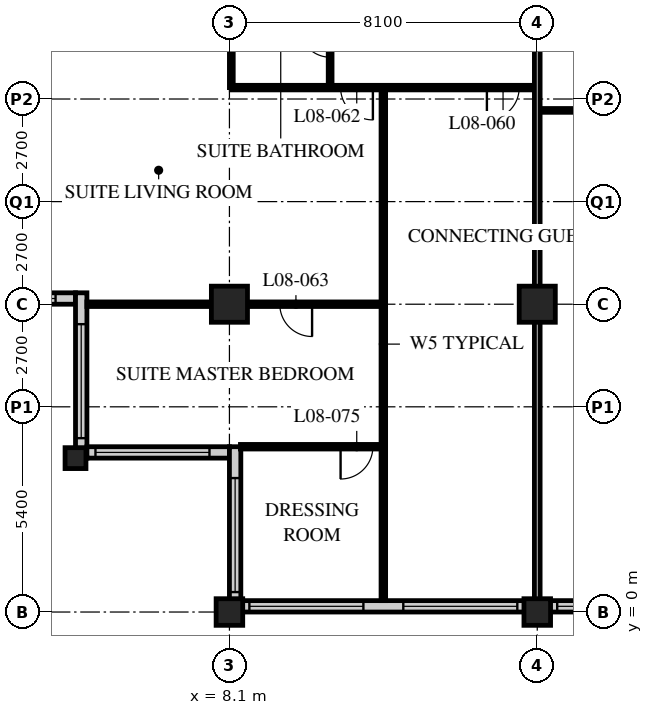
"""IFC4 building model, lengths in metres.
Left out: names, types, materials, properties, quantities, classifications, styles, units other than length and angle.
Written with IfcOpenShell. Run it as: python <this file> out.ifc"""

import sys

from ifc_helpers import new_model, si_unit, direction, frame, frame_2d, origin, origin_2d, place, context, subcontext, project, spatial, rectangle, hollow_rectangle, extrude, element, fill, save


model = new_model("IFC4")
c1 = context("Model", 3, precision=1e-05, world=origin(), true_north=direction((0.0, 1.0)))
c2 = subcontext(c1, "Body", "Model", "MODEL_VIEW")
j1 = project(units=[si_unit("LENGTHUNIT", "METRE"), si_unit("PLANEANGLEUNIT", "RADIAN")], contexts=[c1])
p1 = place(None, origin())
s1 = spatial("IfcSite", under=j1, at=p1, CompositionType="ELEMENT")
p2 = place(p1, origin())
s2 = spatial("IfcBuilding", under=s1, at=p2, CompositionType="ELEMENT")
p3 = place(p2, frame((0.0, 0.0, 39.8)))
s3 = spatial("IfcBuildingStorey", under=s2, at=p3, CompositionType="ELEMENT", Elevation=39.8)
p4 = place(p3, frame((4.05, 4.05, 0.0), z_axis=(0.0, 0.0, 1.0), x_axis=(1.0, 0.0, 0.0)))
e1 = element("IfcColumn", 1, at=p4, inside=s3, PredefinedType="COLUMN", context=c2, shape_type="SweptSolid", body=[
    extrude(hollow_rectangle(XDim=0.55, YDim=0.55, WallThickness=0.05, at=origin_2d()), origin(), (0.0, 0.0, 1.0), 3.4),
])
p5 = place(p3, frame((8.1, 0.0, 0.0), z_axis=(0.0, 0.0, 1.0), x_axis=(1.0, 0.0, 0.0)))
e2 = element("IfcColumn", 2, at=p5, inside=s3, PredefinedType="COLUMN", context=c2, shape_type="SweptSolid", body=[
    extrude(hollow_rectangle(XDim=0.7, YDim=0.7, WallThickness=0.06, at=origin_2d()), origin(), (0.0, 0.0, 1.0), 3.4),
])
p6 = place(p3, frame((8.1, 8.1, 0.0), z_axis=(0.0, 0.0, 1.0), x_axis=(1.0, 0.0, 0.0)))
e3 = element("IfcColumn", 3, at=p6, inside=s3, PredefinedType="COLUMN", context=c2, shape_type="SweptSolid", body=[
    extrude(hollow_rectangle(XDim=0.95, YDim=0.95, WallThickness=0.095, at=origin_2d()), origin(), (0.0, 0.0, 1.0), 3.4),
])
p7 = place(p3, frame((16.2, 0.0, 0.0), z_axis=(0.0, 0.0, 1.0), x_axis=(1.0, 0.0, 0.0)))
e4 = element("IfcColumn", 4, at=p7, inside=s3, PredefinedType="COLUMN", context=c2, shape_type="SweptSolid", body=[
    extrude(hollow_rectangle(XDim=0.7, YDim=0.7, WallThickness=0.06, at=origin_2d()), origin(), (0.0, 0.0, 1.0), 3.4),
])
p8 = place(p3, frame((16.2, 8.1, 0.0), z_axis=(0.0, 0.0, 1.0), x_axis=(1.0, 0.0, 0.0)))
e5 = element("IfcColumn", 5, at=p8, inside=s3, PredefinedType="COLUMN", context=c2, shape_type="SweptSolid", body=[
    extrude(hollow_rectangle(XDim=0.95, YDim=0.95, WallThickness=0.095, at=origin_2d()), origin(), (0.0, 0.0, 1.0), 3.4),
])
p9 = place(p3, frame((8.4, 0.15, 0.0), z_axis=(0.0, 0.0, 1.0), x_axis=(1.0, 0.0, 0.0)))
e6 = element("IfcWall", 6, at=p9, inside=s3, PredefinedType="SOLIDWALL", context=c2, shape_type="SweptSolid", body=[
    extrude(rectangle(XDim=40.2, YDim=0.3, at=frame_2d((20.1, 0.0))), origin(), (0.0, 0.0, 1.0), 3.19),
])
p10 = place(p9, frame((0.225, 0.0, 0.9)))
e7 = element("IfcOpeningElement", 7, at=p10, cuts=e6, PredefinedType="OPENING", context=c2, shape_type="SweptSolid", body=[
    extrude(rectangle(XDim=3.0, YDim=2.0, at=frame_2d((1.5, 1.0))), frame((0.0, 0.16, 0.0), z_axis=(0.0, -1.0, 0.0), x_axis=(1.0, 0.0, 0.0)), (0.0, 0.0, 1.0), 0.32),
])
p11 = place(p9, frame((4.275, 0.0, 0.9)))
e8 = element("IfcOpeningElement", 8, at=p11, cuts=e6, PredefinedType="OPENING", context=c2, shape_type="SweptSolid", body=[
    extrude(rectangle(XDim=3.0, YDim=2.0, at=frame_2d((1.5, 1.0))), frame((0.0, 0.16, 0.0), z_axis=(0.0, -1.0, 0.0), x_axis=(1.0, 0.0, 0.0)), (0.0, 0.0, 1.0), 0.32),
])
p12 = place(p9, frame((8.325, 0.0, 0.9)))
e9 = element("IfcOpeningElement", 9, at=p12, cuts=e6, PredefinedType="OPENING", context=c2, shape_type="SweptSolid", body=[
    extrude(rectangle(XDim=3.0, YDim=2.0, at=frame_2d((1.5, 1.0))), frame((0.0, 0.16, 0.0), z_axis=(0.0, -1.0, 0.0), x_axis=(1.0, 0.0, 0.0)), (0.0, 0.0, 1.0), 0.32),
])
p13 = place(p9, frame((12.375, 0.0, 0.9)))
e10 = element("IfcOpeningElement", 10, at=p13, cuts=e6, PredefinedType="OPENING", context=c2, shape_type="SweptSolid", body=[
    extrude(rectangle(XDim=3.0, YDim=2.0, at=frame_2d((1.5, 1.0))), frame((0.0, 0.16, 0.0), z_axis=(0.0, -1.0, 0.0), x_axis=(1.0, 0.0, 0.0)), (0.0, 0.0, 1.0), 0.32),
])
p14 = place(p9, frame((16.425, 0.0, 0.9)))
e11 = element("IfcOpeningElement", 11, at=p14, cuts=e6, PredefinedType="OPENING", context=c2, shape_type="SweptSolid", body=[
    extrude(rectangle(XDim=3.0, YDim=2.0, at=frame_2d((1.5, 1.0))), frame((0.0, 0.16, 0.0), z_axis=(0.0, -1.0, 0.0), x_axis=(1.0, 0.0, 0.0)), (0.0, 0.0, 1.0), 0.32),
])
p15 = place(p9, frame((20.475, 0.0, 0.9)))
e12 = element("IfcOpeningElement", 12, at=p15, cuts=e6, PredefinedType="OPENING", context=c2, shape_type="SweptSolid", body=[
    extrude(rectangle(XDim=3.0, YDim=2.0, at=frame_2d((1.5, 1.0))), frame((0.0, 0.16, 0.0), z_axis=(0.0, -1.0, 0.0), x_axis=(1.0, 0.0, 0.0)), (0.0, 0.0, 1.0), 0.32),
])
p16 = place(p9, frame((24.525, 0.0, 0.9)))
e13 = element("IfcOpeningElement", 13, at=p16, cuts=e6, PredefinedType="OPENING", context=c2, shape_type="SweptSolid", body=[
    extrude(rectangle(XDim=3.0, YDim=2.0, at=frame_2d((1.5, 1.0))), frame((0.0, 0.16, 0.0), z_axis=(0.0, -1.0, 0.0), x_axis=(1.0, 0.0, 0.0)), (0.0, 0.0, 1.0), 0.32),
])
p17 = place(p9, frame((28.575, 0.0, 0.9)))
e14 = element("IfcOpeningElement", 14, at=p17, cuts=e6, PredefinedType="OPENING", context=c2, shape_type="SweptSolid", body=[
    extrude(rectangle(XDim=3.0, YDim=2.0, at=frame_2d((1.5, 1.0))), frame((0.0, 0.16, 0.0), z_axis=(0.0, -1.0, 0.0), x_axis=(1.0, 0.0, 0.0)), (0.0, 0.0, 1.0), 0.32),
])
p18 = place(p9, frame((32.625, 0.0, 0.9)))
e15 = element("IfcOpeningElement", 15, at=p18, cuts=e6, PredefinedType="OPENING", context=c2, shape_type="SweptSolid", body=[
    extrude(rectangle(XDim=3.0, YDim=2.0, at=frame_2d((1.5, 1.0))), frame((0.0, 0.16, 0.0), z_axis=(0.0, -1.0, 0.0), x_axis=(1.0, 0.0, 0.0)), (0.0, 0.0, 1.0), 0.32),
])
p19 = place(p9, frame((36.675, 0.0, 0.9)))
e16 = element("IfcOpeningElement", 16, at=p19, cuts=e6, PredefinedType="OPENING", context=c2, shape_type="SweptSolid", body=[
    extrude(rectangle(XDim=3.0, YDim=2.0, at=frame_2d((1.5, 1.0))), frame((0.0, 0.16, 0.0), z_axis=(0.0, -1.0, 0.0), x_axis=(1.0, 0.0, 0.0)), (0.0, 0.0, 1.0), 0.32),
])
p20 = place(p3, frame((0.3, 8.25, 0.0), z_axis=(0.0, 0.0, 1.0), x_axis=(1.0, 0.0, 0.0)))
e17 = element("IfcWall", 17, at=p20, inside=s3, PredefinedType="SOLIDWALL", context=c2, shape_type="SweptSolid", body=[
    extrude(rectangle(XDim=3.75, YDim=0.3, at=frame_2d((1.875, 0.0))), origin(), (0.0, 0.0, 1.0), 3.19),
])
p21 = place(p20, frame((0.225, 0.0, 0.9)))
e18 = element("IfcOpeningElement", 18, at=p21, cuts=e17, PredefinedType="OPENING", context=c2, shape_type="SweptSolid", body=[
    extrude(rectangle(XDim=3.0, YDim=1.5, at=frame_2d((1.5, 0.75))), frame((0.0, 0.16, 0.0), z_axis=(0.0, -1.0, 0.0), x_axis=(1.0, 0.0, 0.0)), (0.0, 0.0, 1.0), 0.32),
])
p22 = place(p3, frame((4.2, 8.4, 0.0), z_axis=(0.0, 0.0, 1.0), x_axis=(0.0, -1.0, 0.0)))
e19 = element("IfcWall", 19, at=p22, inside=s3, PredefinedType="SOLIDWALL", context=c2, shape_type="SweptSolid", body=[
    extrude(rectangle(XDim=4.35, YDim=0.3, at=frame_2d((2.175, 0.0))), origin(), (0.0, 0.0, 1.0), 3.19),
])
p23 = place(p22, frame((0.825, 0.0, 0.9)))
e20 = element("IfcOpeningElement", 20, at=p23, cuts=e19, PredefinedType="OPENING", context=c2, shape_type="SweptSolid", body=[
    extrude(rectangle(XDim=3.0, YDim=1.5, at=frame_2d((1.5, 0.75))), frame((0.0, 0.16, 0.0), z_axis=(0.0, -1.0, 0.0), x_axis=(1.0, 0.0, 0.0)), (0.0, 0.0, 1.0), 0.32),
])
p24 = place(p3, frame((4.35, 4.2, 0.0), z_axis=(0.0, 0.0, 1.0), x_axis=(1.0, 0.0, 0.0)))
e21 = element("IfcWall", 21, at=p24, inside=s3, PredefinedType="SOLIDWALL", context=c2, shape_type="SweptSolid", body=[
    extrude(rectangle(XDim=3.75, YDim=0.3, at=frame_2d((1.875, 0.0))), origin(), (0.0, 0.0, 1.0), 3.19),
])
p25 = place(p24, frame((0.225, 0.0, 0.9)))
e22 = element("IfcOpeningElement", 22, at=p25, cuts=e21, PredefinedType="OPENING", context=c2, shape_type="SweptSolid", body=[
    extrude(rectangle(XDim=3.0, YDim=1.5, at=frame_2d((1.5, 0.75))), frame((0.0, 0.16, 0.0), z_axis=(0.0, -1.0, 0.0), x_axis=(1.0, 0.0, 0.0)), (0.0, 0.0, 1.0), 0.32),
])
p26 = place(p3, frame((8.25, 4.35, 0.0), z_axis=(0.0, 0.0, 1.0), x_axis=(0.0, -1.0, 0.0)))
e23 = element("IfcWall", 23, at=p26, inside=s3, PredefinedType="SOLIDWALL", context=c2, shape_type="SweptSolid", body=[
    extrude(rectangle(XDim=4.35, YDim=0.3, at=frame_2d((2.175, 0.0))), origin(), (0.0, 0.0, 1.0), 3.19),
])
p27 = place(p26, frame((0.825, 0.0, 0.9)))
e24 = element("IfcOpeningElement", 24, at=p27, cuts=e23, PredefinedType="OPENING", context=c2, shape_type="SweptSolid", body=[
    extrude(rectangle(XDim=3.0, YDim=1.5, at=frame_2d((1.5, 0.75))), frame((0.0, 0.16, 0.0), z_axis=(0.0, -1.0, 0.0), x_axis=(1.0, 0.0, 0.0)), (0.0, 0.0, 1.0), 0.32),
])
p28 = place(p3, frame((16.2, 13.2, 0.0), z_axis=(0.0, 0.0, 1.0), x_axis=(1.0, 0.0, 0.0)))
e25 = element("IfcWall", 25, at=p28, inside=s3, PredefinedType="PARTITIONING", context=c2, shape_type="SweptSolid", body=[
    extrude(rectangle(XDim=2.3, YDim=0.1, at=frame_2d((1.15, 0.0))), origin(), (0.0, 0.0, 1.0), 3.19),
])
p29 = place(p3, frame((10.75, 16.2, 0.0), z_axis=(0.0, 0.0, 1.0), x_axis=(0.0, -1.0, 0.0)))
e26 = element("IfcWall", 26, at=p29, inside=s3, PredefinedType="PARTITIONING", context=c2, shape_type="SweptSolid", body=[
    extrude(rectangle(XDim=2.4, YDim=0.1, at=frame_2d((1.2, 0.0))), origin(), (0.0, 0.0, 1.0), 3.19),
])
p30 = place(p29, frame((0.8, 0.0, 0.0)))
e27 = element("IfcOpeningElement", 27, at=p30, cuts=e26, PredefinedType="OPENING", context=c2, shape_type="SweptSolid", body=[
    extrude(rectangle(XDim=0.8, YDim=2.1, at=frame_2d((0.4, 1.05))), frame((0.0, 0.06, 0.0), z_axis=(0.0, -1.0, 0.0), x_axis=(1.0, 0.0, 0.0)), (0.0, 0.0, 1.0), 0.12),
])
p31 = place(p3, frame((8.15, 16.2, 0.0), z_axis=(0.0, 0.0, 1.0), x_axis=(0.0, -1.0, 0.0)))
e28 = element("IfcWall", 28, at=p31, inside=s3, PredefinedType="PARTITIONING", context=c2, shape_type="SweptSolid", body=[
    extrude(rectangle(XDim=2.4, YDim=0.1, at=frame_2d((1.2, 0.0))), origin(), (0.0, 0.0, 1.0), 2.578),
])
p32 = place(p3, frame((8.15, 13.8, 0.0), z_axis=(0.0, 0.0, 1.0), x_axis=(1.0, 0.0, 0.0)))
e29 = element("IfcWall", 29, at=p32, inside=s3, PredefinedType="PARTITIONING", context=c2, shape_type="SweptSolid", body=[
    extrude(rectangle(XDim=8.05, YDim=0.12, at=frame_2d((4.025, 0.0))), origin(), (0.0, 0.0, 1.0), 3.19),
])
p33 = place(p32, frame((6.725, 0.0, 0.0)))
e30 = element("IfcOpeningElement", 30, at=p33, cuts=e29, PredefinedType="OPENING", context=c2, shape_type="SweptSolid", body=[
    extrude(rectangle(XDim=0.85, YDim=2.1, at=frame_2d((0.425, 1.05))), frame((0.0, 0.07, 0.0), z_axis=(0.0, -1.0, 0.0), x_axis=(1.0, 0.0, 0.0)), (0.0, 0.0, 1.0), 0.14),
])
p34 = place(p32, frame((2.875, 0.0, 0.0)))
e31 = element("IfcOpeningElement", 31, at=p34, cuts=e29, PredefinedType="OPENING", context=c2, shape_type="SweptSolid", body=[
    extrude(rectangle(XDim=0.85, YDim=2.1, at=frame_2d((0.425, 1.05))), frame((0.0, 0.07, 0.0), z_axis=(0.0, -1.0, 0.0), x_axis=(1.0, 0.0, 0.0)), (0.0, 0.0, 1.0), 0.14),
])
p35 = place(p3, frame((12.15, 13.8, 0.0), z_axis=(0.0, 0.0, 1.0), x_axis=(0.0, -1.0, 0.0)))
e32 = element("IfcWall", 32, at=p35, inside=s3, PredefinedType="PARTITIONING", context=c2, shape_type="SweptSolid", body=[
    extrude(rectangle(XDim=13.5, YDim=0.12, at=frame_2d((6.75, 0.0))), origin(), (0.0, 0.0, 1.0), 3.19),
])
p36 = place(p3, frame((12.15, 8.1, 0.0), z_axis=(0.0, 0.0, 1.0), x_axis=(-1.0, 0.0, 0.0)))
e33 = element("IfcWall", 33, at=p36, inside=s3, PredefinedType="PARTITIONING", context=c2, shape_type="SweptSolid", body=[
    extrude(rectangle(XDim=7.8, YDim=0.12, at=frame_2d((3.9, 0.0))), origin(), (0.0, 0.0, 1.0), 2.578),
])
p37 = place(p36, frame((1.875, 0.0, 0.0)))
e34 = element("IfcOpeningElement", 34, at=p37, cuts=e33, PredefinedType="OPENING", context=c2, shape_type="SweptSolid", body=[
    extrude(rectangle(XDim=0.85, YDim=2.1, at=frame_2d((0.425, 1.05))), frame((0.0, 0.07, 0.0), z_axis=(0.0, -1.0, 0.0), x_axis=(1.0, 0.0, 0.0)), (0.0, 0.0, 1.0), 0.14),
])
p38 = place(p3, frame((16.2, 16.2, 0.0), z_axis=(0.0, 0.0, 1.0), x_axis=(0.0, -1.0, 0.0)))
e35 = element("IfcWall", 35, at=p38, inside=s3, PredefinedType="PARTITIONING", context=c2, shape_type="SweptSolid", body=[
    extrude(rectangle(XDim=15.9, YDim=0.15, at=frame_2d((7.95, 0.0))), origin(), (0.0, 0.0, 1.0), 2.578),
])
p39 = place(p3, frame((8.39, 4.35, 0.0), z_axis=(0.0, 0.0, 1.0), x_axis=(1.0, 0.0, 0.0)))
e36 = element("IfcWall", 36, at=p39, inside=s3, PredefinedType="PARTITIONING", context=c2, shape_type="SweptSolid", body=[
    extrude(rectangle(XDim=3.76, YDim=0.12, at=frame_2d((1.88, 0.0))), origin(), (0.0, 0.0, 1.0), 3.19),
])
p40 = place(p39, frame((2.635, 0.0, 0.0)))
e37 = element("IfcOpeningElement", 37, at=p40, cuts=e36, PredefinedType="OPENING", context=c2, shape_type="SweptSolid", body=[
    extrude(rectangle(XDim=0.85, YDim=2.1, at=frame_2d((0.425, 1.05))), frame((0.0, 0.07, 0.0), z_axis=(0.0, -1.0, 0.0), x_axis=(1.0, 0.0, 0.0)), (0.0, 0.0, 1.0), 0.14),
])
p41 = place(p10, origin())
e38 = element("IfcWindow", 38, at=p41, inside=s3, PartitioningType="SINGLE_PANEL", PredefinedType="WINDOW", context=c2, shape_type="SweptSolid", body=[
    extrude(rectangle(XDim=3.0, YDim=2.0, at=frame_2d((1.5, 1.0))), frame((0.0, 0.03, 0.0), z_axis=(0.0, -1.0, 0.0), x_axis=(1.0, 0.0, 0.0)), (0.0, 0.0, 1.0), 0.06),
])
fill(e7, e38)
p42 = place(p11, origin())
e39 = element("IfcWindow", 39, at=p42, inside=s3, PartitioningType="SINGLE_PANEL", PredefinedType="WINDOW", context=c2, shape_type="SweptSolid", body=[
    extrude(rectangle(XDim=3.0, YDim=2.0, at=frame_2d((1.5, 1.0))), frame((0.0, 0.03, 0.0), z_axis=(0.0, -1.0, 0.0), x_axis=(1.0, 0.0, 0.0)), (0.0, 0.0, 1.0), 0.06),
])
fill(e8, e39)
p43 = place(p12, origin())
e40 = element("IfcWindow", 40, at=p43, inside=s3, PartitioningType="SINGLE_PANEL", PredefinedType="WINDOW", context=c2, shape_type="SweptSolid", body=[
    extrude(rectangle(XDim=3.0, YDim=2.0, at=frame_2d((1.5, 1.0))), frame((0.0, 0.03, 0.0), z_axis=(0.0, -1.0, 0.0), x_axis=(1.0, 0.0, 0.0)), (0.0, 0.0, 1.0), 0.06),
])
fill(e9, e40)
p44 = place(p21, origin())
e41 = element("IfcWindow", 41, at=p44, inside=s3, PartitioningType="SINGLE_PANEL", PredefinedType="WINDOW", context=c2, shape_type="SweptSolid", body=[
    extrude(rectangle(XDim=3.0, YDim=1.5, at=frame_2d((1.5, 0.75))), frame((0.0, 0.03, 0.0), z_axis=(0.0, -1.0, 0.0), x_axis=(1.0, 0.0, 0.0)), (0.0, 0.0, 1.0), 0.06),
])
fill(e18, e41)
p45 = place(p23, origin())
e42 = element("IfcWindow", 42, at=p45, inside=s3, PartitioningType="SINGLE_PANEL", PredefinedType="WINDOW", context=c2, shape_type="SweptSolid", body=[
    extrude(rectangle(XDim=3.0, YDim=1.5, at=frame_2d((1.5, 0.75))), frame((0.0, 0.03, 0.0), z_axis=(0.0, -1.0, 0.0), x_axis=(1.0, 0.0, 0.0)), (0.0, 0.0, 1.0), 0.06),
])
fill(e20, e42)
p46 = place(p25, origin())
e43 = element("IfcWindow", 43, at=p46, inside=s3, PartitioningType="SINGLE_PANEL", PredefinedType="WINDOW", context=c2, shape_type="SweptSolid", body=[
    extrude(rectangle(XDim=3.0, YDim=1.5, at=frame_2d((1.5, 0.75))), frame((0.0, 0.03, 0.0), z_axis=(0.0, -1.0, 0.0), x_axis=(1.0, 0.0, 0.0)), (0.0, 0.0, 1.0), 0.06),
])
fill(e22, e43)
p47 = place(p27, origin())
e44 = element("IfcWindow", 44, at=p47, inside=s3, PartitioningType="SINGLE_PANEL", PredefinedType="WINDOW", context=c2, shape_type="SweptSolid", body=[
    extrude(rectangle(XDim=3.0, YDim=1.5, at=frame_2d((1.5, 0.75))), frame((0.0, 0.03, 0.0), z_axis=(0.0, -1.0, 0.0), x_axis=(1.0, 0.0, 0.0)), (0.0, 0.0, 1.0), 0.06),
])
fill(e24, e44)
p48 = place(p33, origin())
e45 = element("IfcDoor", 45, at=p48, inside=s3, OperationType="SINGLE_SWING_RIGHT", PredefinedType="DOOR", context=c2, shape_type="SweptSolid", body=[
    extrude(rectangle(XDim=0.85, YDim=2.1, at=frame_2d((0.425, 1.05))), frame((0.0, 0.025, 0.0), z_axis=(0.0, -1.0, 0.0), x_axis=(1.0, 0.0, 0.0)), (0.0, 0.0, 1.0), 0.05),
])
fill(e30, e45)
p49 = place(p30, origin())
e46 = element("IfcDoor", 46, at=p49, inside=s3, OperationType="SINGLE_SWING_RIGHT", PredefinedType="DOOR", context=c2, shape_type="SweptSolid", body=[
    extrude(rectangle(XDim=0.8, YDim=2.1, at=frame_2d((0.4, 1.05))), frame((0.0, 0.025, 0.0), z_axis=(0.0, -1.0, 0.0), x_axis=(1.0, 0.0, 0.0)), (0.0, 0.0, 1.0), 0.05),
])
fill(e27, e46)
p50 = place(p34, origin())
e47 = element("IfcDoor", 47, at=p50, inside=s3, OperationType="SINGLE_SWING_LEFT", PredefinedType="DOOR", context=c2, shape_type="SweptSolid", body=[
    extrude(rectangle(XDim=0.85, YDim=2.1, at=frame_2d((0.425, 1.05))), frame((0.0, 0.025, 0.0), z_axis=(0.0, -1.0, 0.0), x_axis=(1.0, 0.0, 0.0)), (0.0, 0.0, 1.0), 0.05),
])
fill(e31, e47)
p51 = place(p37, origin())
e48 = element("IfcDoor", 48, at=p51, inside=s3, OperationType="SINGLE_SWING_LEFT", PredefinedType="DOOR", context=c2, shape_type="SweptSolid", body=[
    extrude(rectangle(XDim=0.85, YDim=2.1, at=frame_2d((0.425, 1.05))), frame((0.0, 0.025, 0.0), z_axis=(0.0, -1.0, 0.0), x_axis=(1.0, 0.0, 0.0)), (0.0, 0.0, 1.0), 0.05),
])
fill(e34, e48)
p52 = place(p40, origin())
e49 = element("IfcDoor", 49, at=p52, inside=s3, OperationType="SINGLE_SWING_RIGHT", PredefinedType="DOOR", context=c2, shape_type="SweptSolid", body=[
    extrude(rectangle(XDim=0.85, YDim=2.1, at=frame_2d((0.425, 1.05))), frame((0.0, 0.025, 0.0), z_axis=(0.0, -1.0, 0.0), x_axis=(1.0, 0.0, 0.0)), (0.0, 0.0, 1.0), 0.05),
])
fill(e37, e49)
save(model, sys.argv[1])
